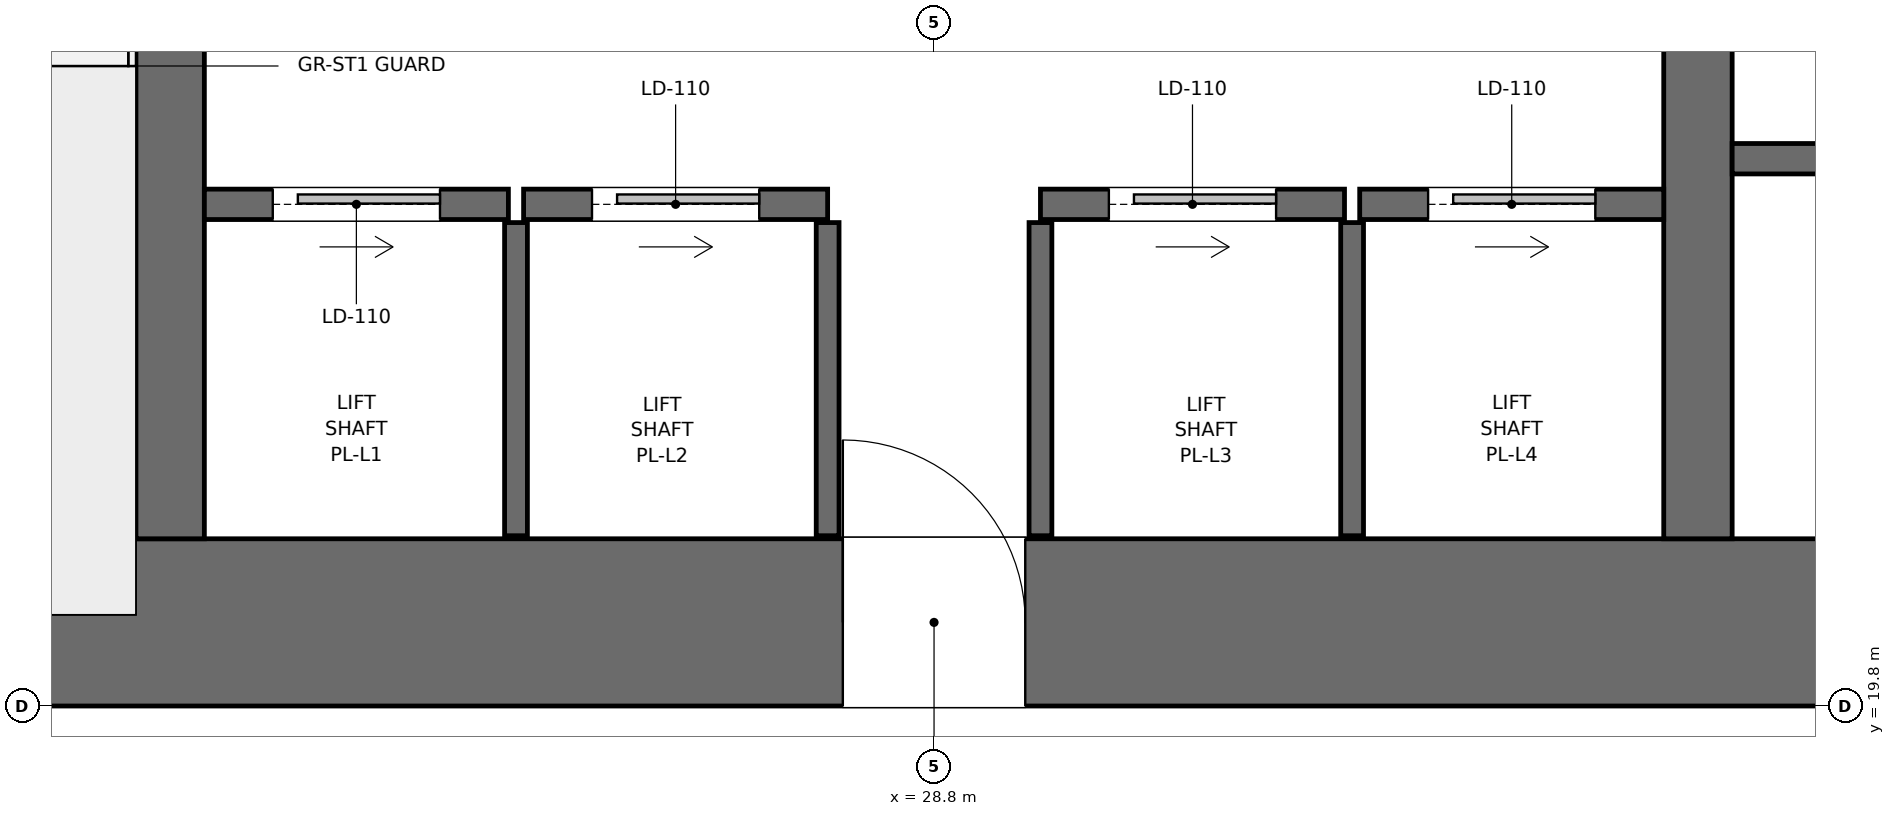
"""IFC4 building model, lengths in metres.
Left out: names, types, materials, properties, quantities, classifications, styles, units other than length and angle.
Written with IfcOpenShell. Run it as: python <this file> out.ifc"""

import sys

from ifc_helpers import new_model, si_unit, direction, frame, frame_2d, origin, place, context, subcontext, project, spatial, rectangle, extrude, element, fill, save


model = new_model("IFC4")
c1 = context("Model", 3, precision=1e-05, world=origin(), true_north=direction((0.0, 1.0)))
c2 = subcontext(c1, "Body", "Model", "MODEL_VIEW")
j1 = project(units=[si_unit("LENGTHUNIT", "METRE"), si_unit("PLANEANGLEUNIT", "RADIAN")], contexts=[c1])
p1 = place(None, origin())
s1 = spatial("IfcSite", under=j1, at=p1, CompositionType="ELEMENT")
p2 = place(p1, origin())
s2 = spatial("IfcBuilding", under=s1, at=p2, CompositionType="ELEMENT")
p3 = place(p2, origin())
s3 = spatial("IfcBuildingStorey", under=s2, at=p3, CompositionType="ELEMENT", Elevation=0.0)
p4 = place(p3, frame((19.8, 20.35, 0.0), z_axis=(0.0, 0.0, 1.0), x_axis=(1.0, 0.0, 0.0)))
e1 = element("IfcWall", 1, at=p4, inside=s3, PredefinedType="SHEAR", context=c2, shape_type="SweptSolid", body=[
    extrude(rectangle(XDim=18.0, YDim=1.1, at=frame_2d((9.0, 0.0))), origin(), (0.0, 0.0, 1.0), 8.4),
])
p5 = place(p4, frame((8.4, 0.0, 0.0)))
e2 = element("IfcOpeningElement", 2, at=p5, cuts=e1, PredefinedType="OPENING", context=c2, shape_type="SweptSolid", body=[
    extrude(rectangle(XDim=1.2, YDim=2.2, at=frame_2d((0.6, 1.1))), frame((0.0, 0.56, 0.0), z_axis=(0.0, -1.0, 0.0), x_axis=(1.0, 0.0, 0.0)), (0.0, 0.0, 1.0), 1.12),
])
for number, where, z_axis, x_axis in (
    (3, (23.775, 20.9, 0.0), (0.0, 0.0, 1.0), (0.0, 1.0, 0.0)),
    (4, (33.825, 20.9, 0.0), (0.0, 0.0, 1.0), (0.0, 1.0, 0.0)),
):
    element("IfcWall", number, at=place(p3, frame(where, z_axis=z_axis, x_axis=x_axis)), inside=s3, PredefinedType="SHEAR", context=c2, shape_type="SweptSolid", body=[
        extrude(rectangle(XDim=15.8, YDim=0.45, at=frame_2d((7.9, 0.0))), origin(), (0.0, 0.0, 1.0), 8.4),
    ])
p6 = place(p3, frame((34.05, 23.4, 0.0), z_axis=(0.0, 0.0, 1.0), x_axis=(1.0, 0.0, 0.0)))
e5 = element("IfcWall", 5, at=p6, inside=s3, PredefinedType="SHEAR", context=c2, shape_type="SweptSolid", body=[
    extrude(rectangle(XDim=3.05, YDim=0.2, at=frame_2d((1.525, 0.0))), origin(), (0.0, 0.0, 1.0), 8.05),
])
p7 = place(p6, frame((1.2, 0.0, 0.0)))
e6 = element("IfcOpeningElement", 6, at=p7, cuts=e5, PredefinedType="OPENING", context=c2, shape_type="SweptSolid", body=[
    extrude(rectangle(XDim=1.1, YDim=2.15, at=frame_2d((0.55, 1.075))), frame((0.0, 0.11, 0.0), z_axis=(0.0, -1.0, 0.0), x_axis=(1.0, 0.0, 0.0)), (0.0, 0.0, 1.0), 0.22),
])
p8 = place(p3, frame((24.0, 23.1, 0.0), z_axis=(0.0, 0.0, 1.0), x_axis=(1.0, 0.0, 0.0)))
e7 = element("IfcWall", 7, at=p8, inside=s3, PredefinedType="SHEAR", context=c2, shape_type="SweptSolid", body=[
    extrude(rectangle(XDim=2.0, YDim=0.2, at=frame_2d((1.0, 0.0))), origin(), (0.0, 0.0, 1.0), 8.05),
])
p9 = place(p8, frame((0.45, 0.0, 0.0)))
e8 = element("IfcOpeningElement", 8, at=p9, cuts=e7, PredefinedType="OPENING", context=c2, shape_type="SweptSolid", body=[
    extrude(rectangle(XDim=1.1, YDim=2.15, at=frame_2d((0.55, 1.075))), frame((0.0, 0.11, 0.0), z_axis=(0.0, -1.0, 0.0), x_axis=(1.0, 0.0, 0.0)), (0.0, 0.0, 1.0), 0.22),
])
p10 = place(p3, frame((26.1, 23.1, 0.0), z_axis=(0.0, 0.0, 1.0), x_axis=(1.0, 0.0, 0.0)))
e9 = element("IfcWall", 9, at=p10, inside=s3, PredefinedType="SHEAR", context=c2, shape_type="SweptSolid", body=[
    extrude(rectangle(XDim=2.0, YDim=0.2, at=frame_2d((1.0, 0.0))), origin(), (0.0, 0.0, 1.0), 8.05),
])
p11 = place(p10, frame((0.45, 0.0, 0.0)))
e10 = element("IfcOpeningElement", 10, at=p11, cuts=e9, PredefinedType="OPENING", context=c2, shape_type="SweptSolid", body=[
    extrude(rectangle(XDim=1.1, YDim=2.15, at=frame_2d((0.55, 1.075))), frame((0.0, 0.11, 0.0), z_axis=(0.0, -1.0, 0.0), x_axis=(1.0, 0.0, 0.0)), (0.0, 0.0, 1.0), 0.22),
])
p12 = place(p3, frame((29.5, 23.1, 0.0), z_axis=(0.0, 0.0, 1.0), x_axis=(1.0, 0.0, 0.0)))
e11 = element("IfcWall", 11, at=p12, inside=s3, PredefinedType="SHEAR", context=c2, shape_type="SweptSolid", body=[
    extrude(rectangle(XDim=2.0, YDim=0.2, at=frame_2d((1.0, 0.0))), origin(), (0.0, 0.0, 1.0), 8.05),
])
p13 = place(p12, frame((0.45, 0.0, 0.0)))
e12 = element("IfcOpeningElement", 12, at=p13, cuts=e11, PredefinedType="OPENING", context=c2, shape_type="SweptSolid", body=[
    extrude(rectangle(XDim=1.1, YDim=2.15, at=frame_2d((0.55, 1.075))), frame((0.0, 0.11, 0.0), z_axis=(0.0, -1.0, 0.0), x_axis=(1.0, 0.0, 0.0)), (0.0, 0.0, 1.0), 0.22),
])
p14 = place(p3, frame((31.6, 23.1, 0.0), z_axis=(0.0, 0.0, 1.0), x_axis=(1.0, 0.0, 0.0)))
e13 = element("IfcWall", 13, at=p14, inside=s3, PredefinedType="SHEAR", context=c2, shape_type="SweptSolid", body=[
    extrude(rectangle(XDim=2.0, YDim=0.2, at=frame_2d((1.0, 0.0))), origin(), (0.0, 0.0, 1.0), 8.05),
])
p15 = place(p14, frame((0.45, 0.0, 0.0)))
e14 = element("IfcOpeningElement", 14, at=p15, cuts=e13, PredefinedType="OPENING", context=c2, shape_type="SweptSolid", body=[
    extrude(rectangle(XDim=1.1, YDim=2.15, at=frame_2d((0.55, 1.075))), frame((0.0, 0.11, 0.0), z_axis=(0.0, -1.0, 0.0), x_axis=(1.0, 0.0, 0.0)), (0.0, 0.0, 1.0), 0.22),
])
for number, where, z_axis, x_axis in (
    (15, (26.05, 20.92, 0.0), (0.0, 0.0, 1.0), (0.0, 1.0, 0.0)),
    (16, (28.1, 20.92, 0.0), (0.0, 0.0, 1.0), (0.0, 1.0, 0.0)),
    (17, (29.5, 20.92, 0.0), (0.0, 0.0, 1.0), (0.0, 1.0, 0.0)),
    (18, (31.55, 20.92, 0.0), (0.0, 0.0, 1.0), (0.0, 1.0, 0.0)),
):
    element("IfcWall", number, at=place(p3, frame(where, z_axis=z_axis, x_axis=x_axis)), inside=s3, PredefinedType="SHEAR", context=c2, shape_type="SweptSolid", body=[
        extrude(rectangle(XDim=2.06, YDim=0.15, at=frame_2d((1.03, 0.0))), origin(), (0.0, 0.0, 1.0), 8.05),
    ])
p16 = place(p9, origin())
e19 = element("IfcDoor", 19, at=p16, inside=s3, OperationType="SLIDING_TO_RIGHT", PredefinedType="DOOR", context=c2, shape_type="SweptSolid", body=[
    extrude(rectangle(XDim=1.1, YDim=2.15, at=frame_2d((0.55, 1.075))), frame((0.0, 0.025, 0.0), z_axis=(0.0, -1.0, 0.0), x_axis=(1.0, 0.0, 0.0)), (0.0, 0.0, 1.0), 0.05),
])
fill(e8, e19)
p17 = place(p11, origin())
e20 = element("IfcDoor", 20, at=p17, inside=s3, OperationType="SLIDING_TO_RIGHT", PredefinedType="DOOR", context=c2, shape_type="SweptSolid", body=[
    extrude(rectangle(XDim=1.1, YDim=2.15, at=frame_2d((0.55, 1.075))), frame((0.0, 0.025, 0.0), z_axis=(0.0, -1.0, 0.0), x_axis=(1.0, 0.0, 0.0)), (0.0, 0.0, 1.0), 0.05),
])
fill(e10, e20)
p18 = place(p13, origin())
e21 = element("IfcDoor", 21, at=p18, inside=s3, OperationType="SLIDING_TO_RIGHT", PredefinedType="DOOR", context=c2, shape_type="SweptSolid", body=[
    extrude(rectangle(XDim=1.1, YDim=2.15, at=frame_2d((0.55, 1.075))), frame((0.0, 0.025, 0.0), z_axis=(0.0, -1.0, 0.0), x_axis=(1.0, 0.0, 0.0)), (0.0, 0.0, 1.0), 0.05),
])
fill(e12, e21)
p19 = place(p15, origin())
e22 = element("IfcDoor", 22, at=p19, inside=s3, OperationType="SLIDING_TO_RIGHT", PredefinedType="DOOR", context=c2, shape_type="SweptSolid", body=[
    extrude(rectangle(XDim=1.1, YDim=2.15, at=frame_2d((0.55, 1.075))), frame((0.0, 0.025, 0.0), z_axis=(0.0, -1.0, 0.0), x_axis=(1.0, 0.0, 0.0)), (0.0, 0.0, 1.0), 0.05),
])
fill(e14, e22)
p20 = place(p5, origin())
e23 = element("IfcDoor", 23, at=p20, inside=s3, OperationType="SINGLE_SWING_LEFT", PredefinedType="DOOR", context=c2, shape_type="SweptSolid", body=[
    extrude(rectangle(XDim=1.2, YDim=2.2, at=frame_2d((0.6, 1.1))), frame((0.0, 0.025, 0.0), z_axis=(0.0, -1.0, 0.0), x_axis=(1.0, 0.0, 0.0)), (0.0, 0.0, 1.0), 0.05),
])
fill(e2, e23)
save(model, sys.argv[1])
